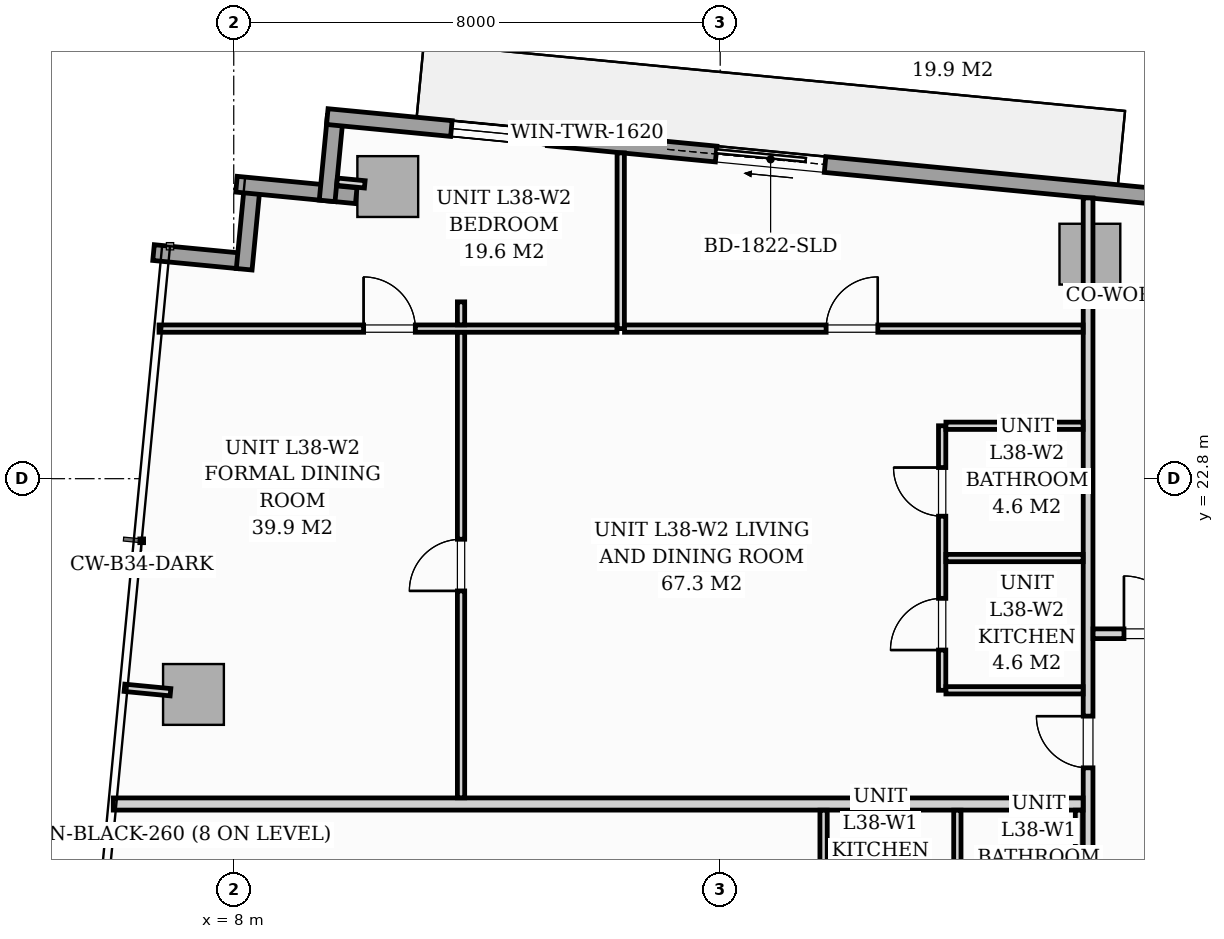
"""IFC4 building model, lengths in metres.
Left out: names, types, materials, properties, quantities, classifications, styles, units other than length and angle.
Written with IfcOpenShell. Run it as: python <this file> out.ifc"""

import sys

from ifc_helpers import new_model, si_unit, direction, frame, frame_2d, origin, origin_2d, place, context, subcontext, project, spatial, rectangle, extrude, source, transform, mapped, element, fill, save


model = new_model("IFC4")
c1 = context("Model", 3, precision=1e-05, world=origin(), true_north=direction((0.0, 1.0)))
c2 = subcontext(c1, "Body", "Model", "MODEL_VIEW")
j1 = project(units=[si_unit("LENGTHUNIT", "METRE"), si_unit("PLANEANGLEUNIT", "RADIAN")], contexts=[c1])
p1 = place(None, origin())
s1 = spatial("IfcSite", under=j1, at=p1, CompositionType="ELEMENT")
p2 = place(p1, origin())
s2 = spatial("IfcBuilding", under=s1, at=p2, CompositionType="ELEMENT")
p3 = place(p2, frame((0.0, 0.0, 134.2)))
s3 = spatial("IfcBuildingStorey", under=s2, at=p3, CompositionType="ELEMENT", Elevation=134.2)
m1 = source(origin(), c2, "Body", "SweptSolid", [
    extrude(rectangle(XDim=1.0, YDim=1.0, at=origin_2d()), origin(), (0.0, 0.0, 1.0), 3.196),
])
for number, where, z_axis, x_axis in (
    (1, (10.533, 27.604, 0.002), (0.0, 0.0, 1.0), (0.995, -0.096, 0.0)),
    (2, (22.08, 26.492, 0.002), (0.0, 0.0, 1.0), (0.995, -0.096, 0.0)),
    (3, (7.338, 19.252, 0.002), (0.0, 0.0, 1.0), (0.995, -0.096, 0.0)),
):
    element("IfcColumn", number, at=place(p3, frame(where, z_axis=z_axis, x_axis=x_axis)), inside=s3, PredefinedType="COLUMN", context=c2, shape_type="MappedRepresentation", body=[
        mapped(m1, transform((0.0, 0.0, 0.0), scale=1.0)),
    ])
p4 = place(p3, frame((6.681, 26.518, 0.0), z_axis=(0.0, 0.0, 1.0), x_axis=(0.995389446633, -0.095915846097, 0.0)))
e4 = element("IfcWall", 4, at=p4, inside=s3, PredefinedType="STANDARD", context=c2, shape_type="SweptSolid", body=[
    extrude(rectangle(XDim=1.395, YDim=0.26, at=frame_2d((0.697, 0.0))), origin(), (0.0, 0.0, 1.0), 2.94),
])
p5 = place(p3, frame((8.172, 26.244, 0.0), z_axis=(0.0, 0.0, 1.0), x_axis=(0.095725744959, 0.99540774648, 0.0)))
e5 = element("IfcWall", 5, at=p5, inside=s3, PredefinedType="STANDARD", context=c2, shape_type="SweptSolid", body=[
    extrude(rectangle(XDim=1.395, YDim=0.26, at=frame_2d((0.698, 0.0))), origin(), (0.0, 0.0, 1.0), 2.94),
])
p6 = place(p3, frame((8.045, 27.643, 0.0), z_axis=(0.0, 0.0, 1.0), x_axis=(0.995391147587, -0.095898192396, 0.0)))
e6 = element("IfcWall", 6, at=p6, inside=s3, PredefinedType="STANDARD", context=c2, shape_type="SweptSolid", body=[
    extrude(rectangle(XDim=1.978, YDim=0.26, at=frame_2d((0.989, 0.0))), origin(), (0.0, 0.0, 1.0), 2.94),
])
p7 = place(p3, frame((9.536, 27.368, 0.0), z_axis=(0.0, 0.0, 1.0), x_axis=(0.095915846097, 0.995389446633, 0.0)))
e7 = element("IfcWall", 7, at=p7, inside=s3, PredefinedType="STANDARD", context=c2, shape_type="SweptSolid", body=[
    extrude(rectangle(XDim=1.395, YDim=0.26, at=frame_2d((0.697, 0.0))), origin(), (0.0, 0.0, 1.0), 2.94),
])
p8 = place(p3, frame((9.539, 28.754, 0.0), z_axis=(0.0, 0.0, 1.0), x_axis=(0.995397345886, -0.09583383433, 0.0)))
e8 = element("IfcWall", 8, at=p8, inside=s3, PredefinedType="STANDARD", context=c2, shape_type="SweptSolid", body=[
    extrude(rectangle(XDim=17.01, YDim=0.26, at=frame_2d((8.505, 0.0))), origin(), (0.0, 0.0, 1.0), 2.94),
])
p9 = place(p8, frame((6.424, 0.0, 0.0)))
e9 = element("IfcOpeningElement", 9, at=p9, cuts=e8, PredefinedType="OPENING", context=c2, shape_type="SweptSolid", body=[
    extrude(rectangle(XDim=1.8, YDim=2.06, at=frame_2d((0.9, 1.03))), frame((0.0, 0.14, 0.0), z_axis=(0.0, -1.0, 0.0), x_axis=(1.0, 0.0, 0.0)), (0.0, 0.0, 1.0), 0.28),
])
p10 = place(p8, frame((2.05, 0.0, 0.65)))
e10 = element("IfcOpeningElement", 10, at=p10, cuts=e8, PredefinedType="OPENING", context=c2, shape_type="SweptSolid", body=[
    extrude(rectangle(XDim=1.6, YDim=1.5, at=frame_2d((0.8, 0.75))), frame((0.0, 0.14, 0.0), z_axis=(0.0, -1.0, 0.0), x_axis=(1.0, 0.0, 0.0)), (0.0, 0.0, 1.0), 0.28),
])
p11 = place(p3, frame((22.05, 12.732, 0.0), z_axis=(0.0, 0.0, 1.0), x_axis=(0.0, 1.0, 0.0)))
e11 = element("IfcWall", 11, at=p11, inside=s3, PredefinedType="PARTITIONING", context=c2, shape_type="SweptSolid", body=[
    extrude(rectangle(XDim=14.685, YDim=0.16, at=frame_2d((7.343, 0.0))), origin(), (0.0, 0.0, 1.0), 2.94),
])
p12 = place(p11, frame((0.493, 0.0, 0.0)))
e12 = element("IfcOpeningElement", 12, at=p12, cuts=e11, PredefinedType="OPENING", context=c2, shape_type="SweptSolid", body=[
    extrude(rectangle(XDim=0.95, YDim=2.06, at=frame_2d((0.475, 1.03))), frame((0.0, 0.09, 0.0), z_axis=(0.0, -1.0, 0.0), x_axis=(1.0, 0.0, 0.0)), (0.0, 0.0, 1.0), 0.18),
])
p13 = place(p11, frame((5.313, 0.0, 0.0)))
e13 = element("IfcOpeningElement", 13, at=p13, cuts=e11, PredefinedType="OPENING", context=c2, shape_type="SweptSolid", body=[
    extrude(rectangle(XDim=0.85, YDim=2.0, at=frame_2d((0.425, 1.0))), frame((0.0, 0.09, 0.0), z_axis=(0.0, -1.0, 0.0), x_axis=(1.0, 0.0, 0.0)), (0.0, 0.0, 1.0), 0.18),
])
p14 = place(p3, frame((6.019, 17.45, 0.0), z_axis=(0.0, 0.0, 1.0), x_axis=(1.0, 0.0, 0.0)))
e14 = element("IfcWall", 14, at=p14, inside=s3, PredefinedType="PARTITIONING", context=c2, shape_type="SweptSolid", body=[
    extrude(rectangle(XDim=15.949, YDim=0.2, at=frame_2d((7.975, 0.0))), origin(), (0.0, 0.0, 1.0), 2.94),
])
for number, where, z_axis, x_axis in (
    (15, (17.7, 15.162, 0.0), (0.0, 0.0, 1.0), (0.0, 1.0, 0.0)),
    (16, (19.9, 15.162, 0.0), (0.0, 0.0, 1.0), (0.0, 1.0, 0.0)),
    (17, (21.9, 15.162, 0.0), (0.0, 0.0, 1.0), (0.0, 1.0, 0.0)),
):
    element("IfcWall", number, at=place(p3, frame(where, z_axis=z_axis, x_axis=x_axis)), inside=s3, PredefinedType="PARTITIONING", context=c2, shape_type="SweptSolid", body=[
        extrude(rectangle(XDim=2.186, YDim=0.12, at=frame_2d((1.093, 0.0))), origin(), (0.0, 0.0, 1.0), 2.94),
    ])
p15 = place(p3, frame((19.65, 19.32, 0.0), z_axis=(0.0, 0.0, 1.0), x_axis=(0.0, 1.0, 0.0)))
e18 = element("IfcWall", 18, at=p15, inside=s3, PredefinedType="PARTITIONING", context=c2, shape_type="SweptSolid", body=[
    extrude(rectangle(XDim=4.35, YDim=0.12, at=frame_2d((2.175, 0.0))), origin(), (0.0, 0.0, 1.0), 2.94),
])
p16 = place(p15, frame((0.662, 0.0, 0.0)))
e19 = element("IfcOpeningElement", 19, at=p16, cuts=e18, PredefinedType="OPENING", context=c2, shape_type="SweptSolid", body=[
    extrude(rectangle(XDim=0.85, YDim=2.05, at=frame_2d((0.425, 1.025))), frame((0.0, 0.07, 0.0), z_axis=(0.0, -1.0, 0.0), x_axis=(1.0, 0.0, 0.0)), (0.0, 0.0, 1.0), 0.14),
])
p17 = place(p15, frame((2.863, 0.0, 0.0)))
e20 = element("IfcOpeningElement", 20, at=p17, cuts=e18, PredefinedType="OPENING", context=c2, shape_type="SweptSolid", body=[
    extrude(rectangle(XDim=0.8, YDim=2.02, at=frame_2d((0.4, 1.01))), frame((0.0, 0.07, 0.0), z_axis=(0.0, -1.0, 0.0), x_axis=(1.0, 0.0, 0.0)), (0.0, 0.0, 1.0), 0.14),
])
for number, where, z_axis, x_axis in (
    (21, (19.712, 21.495, 0.0), (0.0, 0.0, 1.0), (1.0, 0.0, 0.0)),
    (22, (19.712, 19.32, 0.0), (0.0, 0.0, 1.0), (1.0, 0.0, 0.0)),
    (23, (19.712, 23.67, 0.0), (0.0, 0.0, 1.0), (1.0, 0.0, 0.0)),
):
    element("IfcWall", number, at=place(p3, frame(where, z_axis=z_axis, x_axis=x_axis)), inside=s3, PredefinedType="PARTITIONING", context=c2, shape_type="SweptSolid", body=[
        extrude(rectangle(XDim=2.256, YDim=0.12, at=frame_2d((1.128, 0.0))), origin(), (0.0, 0.0, 1.0), 2.94),
    ])
p18 = place(p3, frame((14.364, 25.268, 0.0), z_axis=(0.0, 0.0, 1.0), x_axis=(0.0, 1.0, 0.0)))
e24 = element("IfcWall", 24, at=p18, inside=s3, PredefinedType="PARTITIONING", context=c2, shape_type="SweptSolid", body=[
    extrude(rectangle(XDim=2.889, YDim=0.12, at=frame_2d((1.445, 0.0))), origin(), (0.0, 0.0, 1.0), 2.94),
])
p19 = place(p3, frame((6.772, 25.268, 0.0), z_axis=(0.0, 0.0, 1.0), x_axis=(1.0, 0.0, 0.0)))
e25 = element("IfcWall", 25, at=p19, inside=s3, PredefinedType="PARTITIONING", context=c2, shape_type="SweptSolid", body=[
    extrude(rectangle(XDim=7.53, YDim=0.12, at=frame_2d((3.765, 0.0))), origin(), (0.0, 0.0, 1.0), 2.94),
])
p20 = place(p19, frame((3.364, 0.0, 0.0)))
e26 = element("IfcOpeningElement", 26, at=p20, cuts=e25, PredefinedType="OPENING", context=c2, shape_type="SweptSolid", body=[
    extrude(rectangle(XDim=0.85, YDim=2.05, at=frame_2d((0.425, 1.025))), frame((0.0, 0.07, 0.0), z_axis=(0.0, -1.0, 0.0), x_axis=(1.0, 0.0, 0.0)), (0.0, 0.0, 1.0), 0.14),
])
p21 = place(p3, frame((14.426, 25.268, 0.0), z_axis=(0.0, 0.0, 1.0), x_axis=(1.0, 0.0, 0.0)))
e27 = element("IfcWall", 27, at=p21, inside=s3, PredefinedType="PARTITIONING", context=c2, shape_type="SweptSolid", body=[
    extrude(rectangle(XDim=7.542, YDim=0.12, at=frame_2d((3.771, 0.0))), origin(), (0.0, 0.0, 1.0), 2.94),
])
p22 = place(p21, frame((3.316, 0.0, 0.0)))
e28 = element("IfcOpeningElement", 28, at=p22, cuts=e27, PredefinedType="OPENING", context=c2, shape_type="SweptSolid", body=[
    extrude(rectangle(XDim=0.85, YDim=2.05, at=frame_2d((0.425, 1.025))), frame((0.0, 0.07, 0.0), z_axis=(0.0, -1.0, 0.0), x_axis=(1.0, 0.0, 0.0)), (0.0, 0.0, 1.0), 0.14),
])
p23 = place(p3, frame((11.738, 17.552, 0.0), z_axis=(0.0, 0.0, 1.0), x_axis=(0.0, 1.0, 0.0)))
e29 = element("IfcWall", 29, at=p23, inside=s3, PredefinedType="PARTITIONING", context=c2, shape_type="SweptSolid", body=[
    extrude(rectangle(XDim=7.654, YDim=0.12, at=frame_2d((3.827, 0.0))), origin(), (0.0, 0.0, 1.0), 2.94),
])
p24 = place(p23, frame((3.402, 0.0, 0.0)))
e30 = element("IfcOpeningElement", 30, at=p24, cuts=e29, PredefinedType="OPENING", context=c2, shape_type="SweptSolid", body=[
    extrude(rectangle(XDim=0.85, YDim=2.05, at=frame_2d((0.425, 1.025))), frame((0.0, 0.07, 0.0), z_axis=(0.0, -1.0, 0.0), x_axis=(1.0, 0.0, 0.0)), (0.0, 0.0, 1.0), 0.14),
])
p25 = place(p3, frame((11.738, 25.33, 0.0), z_axis=(0.0, 0.0, 1.0), x_axis=(0.0, 1.0, 0.0)))
e31 = element("IfcWall", 31, at=p25, inside=s3, PredefinedType="PARTITIONING", context=c2, shape_type="SweptSolid", body=[
    extrude(rectangle(XDim=0.378, YDim=0.12, at=frame_2d((0.189, 0.0))), origin(), (0.0, 0.0, 1.0), 2.94),
])
p26 = place(p3, frame((22.132, 20.25, 0.0), z_axis=(0.0, 0.0, 1.0), x_axis=(1.0, 0.0, 0.0)))
e32 = element("IfcWall", 32, at=p26, inside=s3, PredefinedType="PARTITIONING", context=c2, shape_type="SweptSolid", body=[
    extrude(rectangle(XDim=1.886, YDim=0.16, at=frame_2d((0.943, 0.0))), origin(), (0.0, 0.0, 1.0), 2.94),
])
p27 = place(p26, frame((0.508, 0.0, 0.0)))
e33 = element("IfcOpeningElement", 33, at=p27, cuts=e32, PredefinedType="OPENING", context=c2, shape_type="SweptSolid", body=[
    extrude(rectangle(XDim=0.95, YDim=2.06, at=frame_2d((0.475, 1.03))), frame((0.0, 0.09, 0.0), z_axis=(0.0, -1.0, 0.0), x_axis=(1.0, 0.0, 0.0)), (0.0, 0.0, 1.0), 0.18),
])
p28 = place(p3, frame((10.155, 27.64, 0.0), z_axis=(0.0, 0.0, 1.0), x_axis=(-0.995435366701, 0.095438098896, 0.0)))
e34 = element("IfcWall", 34, at=p28, inside=s3, PredefinedType="PARTITIONING", context=c2, shape_type="SweptSolid", body=[
    extrude(rectangle(XDim=0.458, YDim=0.12, at=frame_2d((0.229, 0.0))), origin(), (0.0, 0.0, 1.0), 2.94),
])
p29 = place(p3, frame((6.959, 19.288, 0.0), z_axis=(0.0, 0.0, 1.0), x_axis=(-0.995377786728, 0.096036772582, 0.0)))
e35 = element("IfcWall", 35, at=p29, inside=s3, PredefinedType="PARTITIONING", context=c2, shape_type="SweptSolid", body=[
    extrude(rectangle(XDim=0.76, YDim=0.12, at=frame_2d((0.38, 0.0))), origin(), (0.0, 0.0, 1.0), 2.94),
])
m2 = source(origin(), c2, "Body", "SweptSolid", [
    extrude(rectangle(XDim=1.8, YDim=2.06, at=frame_2d((0.9, 1.03))), frame((0.0, 0.025, 0.0), z_axis=(0.0, -1.0, 0.0), x_axis=(1.0, 0.0, 0.0)), (0.0, 0.0, 1.0), 0.05),
])
p30 = place(p9, origin())
e36 = element("IfcDoor", 36, at=p30, inside=s3, OperationType="SLIDING_TO_LEFT", PredefinedType="DOOR", context=c2, shape_type="MappedRepresentation", body=[
    mapped(m2, transform((0.0, 0.0, 0.0), scale=1.0)),
])
fill(e9, e36)
m3 = source(origin(), c2, "Body", "SweptSolid", [
    extrude(rectangle(XDim=1.6, YDim=1.5, at=frame_2d((0.8, 0.75))), frame((0.0, 0.03, 0.0), z_axis=(0.0, -1.0, 0.0), x_axis=(1.0, 0.0, 0.0)), (0.0, 0.0, 1.0), 0.06),
])
p31 = place(p10, origin())
e37 = element("IfcWindow", 37, at=p31, inside=s3, PartitioningType="SINGLE_PANEL", PredefinedType="WINDOW", context=c2, shape_type="MappedRepresentation", body=[
    mapped(m3, transform((0.0, 0.0, 0.0), scale=1.0)),
])
fill(e10, e37)
m4 = source(origin(), c2, "Body", "SweptSolid", [
    extrude(rectangle(XDim=0.85, YDim=2.0, at=frame_2d((0.425, 1.0))), frame((0.0, 0.025, 0.0), z_axis=(0.0, -1.0, 0.0), x_axis=(1.0, 0.0, 0.0)), (0.0, 0.0, 1.0), 0.05),
])
p32 = place(p13, origin())
e38 = element("IfcDoor", 38, at=p32, inside=s3, OperationType="SINGLE_SWING_RIGHT", PredefinedType="DOOR", context=c2, shape_type="MappedRepresentation", body=[
    mapped(m4, transform((0.0, 0.0, 0.0), scale=1.0)),
])
fill(e13, e38)
m5 = source(origin(), c2, "Body", "SweptSolid", [
    extrude(rectangle(XDim=0.85, YDim=2.05, at=frame_2d((0.425, 1.025))), frame((0.0, 0.025, 0.0), z_axis=(0.0, -1.0, 0.0), x_axis=(1.0, 0.0, 0.0)), (0.0, 0.0, 1.0), 0.05),
])
p33 = place(p16, origin())
e39 = element("IfcDoor", 39, at=p33, inside=s3, OperationType="SINGLE_SWING_LEFT", PredefinedType="DOOR", context=c2, shape_type="MappedRepresentation", body=[
    mapped(m5, transform((0.0, 0.0, 0.0), scale=1.0)),
])
fill(e19, e39)
m6 = source(origin(), c2, "Body", "SweptSolid", [
    extrude(rectangle(XDim=0.8, YDim=2.02, at=frame_2d((0.4, 1.01))), frame((0.0, 0.025, 0.0), z_axis=(0.0, -1.0, 0.0), x_axis=(1.0, 0.0, 0.0)), (0.0, 0.0, 1.0), 0.05),
])
p34 = place(p17, origin())
e40 = element("IfcDoor", 40, at=p34, inside=s3, OperationType="SINGLE_SWING_RIGHT", PredefinedType="DOOR", context=c2, shape_type="MappedRepresentation", body=[
    mapped(m6, transform((0.0, 0.0, 0.0), scale=1.0)),
])
fill(e20, e40)
p35 = place(p20, origin())
e41 = element("IfcDoor", 41, at=p35, inside=s3, OperationType="SINGLE_SWING_LEFT", PredefinedType="DOOR", context=c2, shape_type="MappedRepresentation", body=[
    mapped(m5, transform((0.0, 0.0, 0.0), scale=1.0)),
])
fill(e26, e41)
p36 = place(p22, origin())
e42 = element("IfcDoor", 42, at=p36, inside=s3, OperationType="SINGLE_SWING_RIGHT", PredefinedType="DOOR", context=c2, shape_type="MappedRepresentation", body=[
    mapped(m5, transform((0.0, 0.0, 0.0), scale=1.0)),
])
fill(e28, e42)
p37 = place(p24, origin())
e43 = element("IfcDoor", 43, at=p37, inside=s3, OperationType="SINGLE_SWING_LEFT", PredefinedType="DOOR", context=c2, shape_type="MappedRepresentation", body=[
    mapped(m5, transform((0.0, 0.0, 0.0), scale=1.0)),
])
fill(e30, e43)
m7 = source(origin(), c2, "Body", "SweptSolid", [
    extrude(rectangle(XDim=0.95, YDim=2.06, at=frame_2d((0.475, 1.03))), frame((0.0, 0.025, 0.0), z_axis=(0.0, -1.0, 0.0), x_axis=(1.0, 0.0, 0.0)), (0.0, 0.0, 1.0), 0.05),
])
p38 = place(p27, origin())
e44 = element("IfcDoor", 44, at=p38, inside=s3, OperationType="SINGLE_SWING_LEFT", PredefinedType="DOOR", context=c2, shape_type="MappedRepresentation", body=[
    mapped(m7, transform((0.0, 0.0, 0.0), scale=1.0)),
])
fill(e33, e44)
save(model, sys.argv[1])
